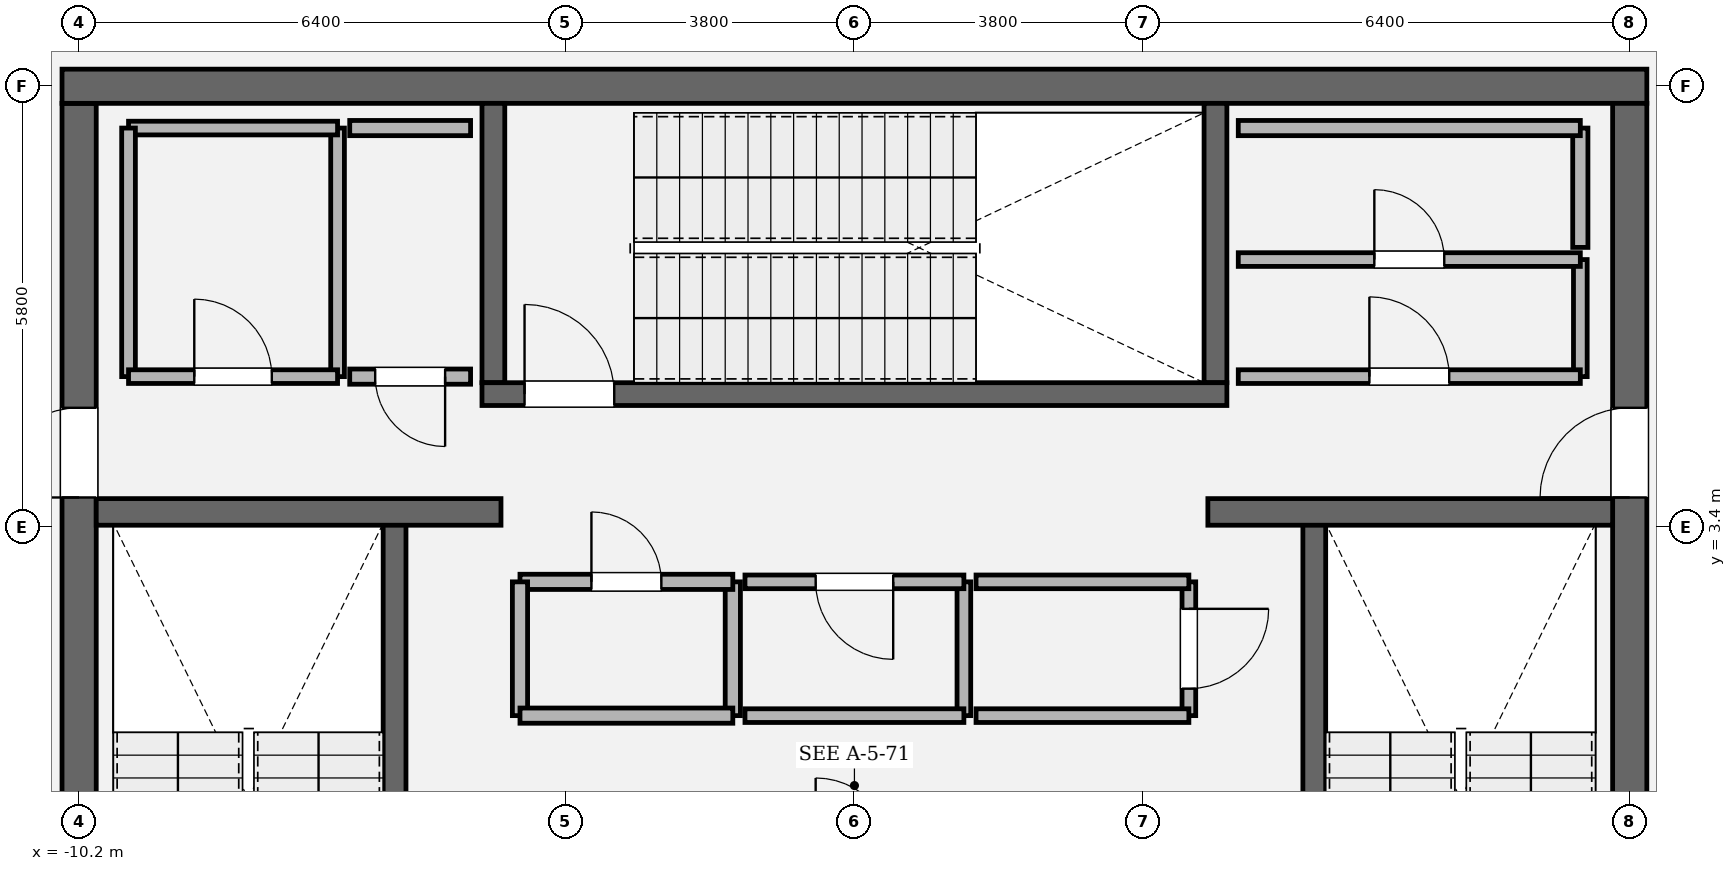
"""IFC4 building model, lengths in metres.
Left out: names, types, materials, properties, quantities, classifications, styles, units other than length and angle.
Written with IfcOpenShell. Run it as: python <this file> out.ifc"""

import sys

from ifc_helpers import new_model, si_unit, direction, frame, frame_2d, origin, place, context, subcontext, project, spatial, rectangle, extrude, element, fill, save


model = new_model("IFC4")
c1 = context("Model", 3, precision=1e-05, world=origin(), true_north=direction((0.0, 1.0)))
c2 = subcontext(c1, "Body", "Model", "MODEL_VIEW")
j1 = project(units=[si_unit("LENGTHUNIT", "METRE"), si_unit("PLANEANGLEUNIT", "RADIAN")], contexts=[c1])
p1 = place(None, origin())
s1 = spatial("IfcSite", under=j1, at=p1, CompositionType="ELEMENT")
p2 = place(p1, origin())
s2 = spatial("IfcBuilding", under=s1, at=p2, CompositionType="ELEMENT")
p3 = place(p2, frame((0.0, 0.0, 339.0)))
s3 = spatial("IfcBuildingStorey", under=s2, at=p3, CompositionType="ELEMENT", Elevation=339.0)
p4 = place(p3, frame((-10.2, -8.975, 0.0), z_axis=(0.0, 0.0, 1.0), x_axis=(0.0, 1.0, 0.0)))
e1 = element("IfcWall", 1, at=p4, inside=s3, PredefinedType="SHEAR", context=c2, shape_type="SweptSolid", body=[
    extrude(rectangle(XDim=17.95, YDim=0.45, at=frame_2d((8.975, 0.0))), origin(), (0.0, 0.0, 1.0), 4.8),
])
p5 = place(p4, frame((12.765, 0.0, 0.0)))
e2 = element("IfcOpeningElement", 2, at=p5, cuts=e1, PredefinedType="OPENING", context=c2, shape_type="SweptSolid", body=[
    extrude(rectangle(XDim=1.18, YDim=2.2, at=frame_2d((0.59, 1.1))), frame((0.0, 0.235, 0.0), z_axis=(0.0, -1.0, 0.0), x_axis=(1.0, 0.0, 0.0)), (0.0, 0.0, 1.0), 0.47),
])
p6 = place(p3, frame((-10.425, 9.2, 0.0), z_axis=(0.0, 0.0, 1.0), x_axis=(1.0, 0.0, 0.0)))
e3 = element("IfcWall", 3, at=p6, inside=s3, PredefinedType="SHEAR", context=c2, shape_type="SweptSolid", body=[
    extrude(rectangle(XDim=20.85, YDim=0.45, at=frame_2d((10.425, 0.0))), origin(), (0.0, 0.0, 1.0), 4.8),
])
p7 = place(p3, frame((10.2, 8.975, 0.0), z_axis=(0.0, 0.0, 1.0), x_axis=(0.0, -1.0, 0.0)))
e4 = element("IfcWall", 4, at=p7, inside=s3, PredefinedType="SHEAR", context=c2, shape_type="SweptSolid", body=[
    extrude(rectangle(XDim=17.95, YDim=0.45, at=frame_2d((8.975, 0.0))), origin(), (0.0, 0.0, 1.0), 4.8),
])
p8 = place(p7, frame((4.005, 0.0, 0.0)))
e5 = element("IfcOpeningElement", 5, at=p8, cuts=e4, PredefinedType="OPENING", context=c2, shape_type="SweptSolid", body=[
    extrude(rectangle(XDim=1.18, YDim=2.2, at=frame_2d((0.59, 1.1))), frame((0.0, 0.235, 0.0), z_axis=(0.0, -1.0, 0.0), x_axis=(1.0, 0.0, 0.0)), (0.0, 0.0, 1.0), 0.47),
])
for number, where, z_axis, x_axis in (
    (6, (-6.05, -5.5, 0.0), (0.0, 0.0, 1.0), (0.0, 1.0, 0.0)),
    (7, (6.05, 3.45, 0.0), (0.0, 0.0, 1.0), (0.0, -1.0, 0.0)),
):
    element("IfcWall", number, at=place(p3, frame(where, z_axis=z_axis, x_axis=x_axis)), inside=s3, PredefinedType="SOLIDWALL", context=c2, shape_type="SweptSolid", body=[
        extrude(rectangle(XDim=8.95, YDim=0.3, at=frame_2d((4.475, 0.0))), origin(), (0.0, 0.0, 1.0), 4.8),
    ])
for number, where, z_axis, x_axis in (
    (8, (-4.75, 5.3, 0.0), (0.0, 0.0, 1.0), (0.0, 1.0, 0.0)),
    (9, (4.75, 8.975, 0.0), (0.0, 0.0, 1.0), (0.0, -1.0, 0.0)),
):
    element("IfcWall", number, at=place(p3, frame(where, z_axis=z_axis, x_axis=x_axis)), inside=s3, PredefinedType="SOLIDWALL", context=c2, shape_type="SweptSolid", body=[
        extrude(rectangle(XDim=3.675, YDim=0.3, at=frame_2d((1.837, 0.0))), origin(), (0.0, 0.0, 1.0), 4.8),
    ])
p9 = place(p3, frame((-4.9, 5.15, 0.0), z_axis=(0.0, 0.0, 1.0), x_axis=(1.0, 0.0, 0.0)))
e10 = element("IfcWall", 10, at=p9, inside=s3, PredefinedType="SOLIDWALL", context=c2, shape_type="SweptSolid", body=[
    extrude(rectangle(XDim=9.8, YDim=0.3, at=frame_2d((4.9, 0.0))), origin(), (0.0, 0.0, 1.0), 4.8),
])
p10 = place(p9, frame((0.56, 0.0, 0.0)))
e11 = element("IfcOpeningElement", 11, at=p10, cuts=e10, PredefinedType="OPENING", context=c2, shape_type="SweptSolid", body=[
    extrude(rectangle(XDim=1.18, YDim=2.2, at=frame_2d((0.59, 1.1))), frame((0.0, 0.16, 0.0), z_axis=(0.0, -1.0, 0.0), x_axis=(1.0, 0.0, 0.0)), (0.0, 0.0, 1.0), 0.32),
])
for number, where, z_axis, x_axis in (
    (12, (-9.975, 3.6, 0.0), (0.0, 0.0, 1.0), (1.0, 0.0, 0.0)),
    (13, (4.65, 3.6, 0.0), (0.0, 0.0, 1.0), (1.0, 0.0, 0.0)),
):
    element("IfcWall", number, at=place(p3, frame(where, z_axis=z_axis, x_axis=x_axis)), inside=s3, PredefinedType="SOLIDWALL", context=c2, shape_type="SweptSolid", body=[
        extrude(rectangle(XDim=5.325, YDim=0.35, at=frame_2d((2.663, 0.0))), origin(), (0.0, 0.0, 1.0), 4.8),
    ])
p11 = place(p3, frame((-1.6, 0.92, 0.0), z_axis=(0.0, 0.0, 1.0), x_axis=(0.0, 1.0, 0.0)))
e14 = element("IfcWall", 14, at=p11, inside=s3, PredefinedType="SOLIDWALL", context=c2, shape_type="SweptSolid", body=[
    extrude(rectangle(XDim=1.76, YDim=0.2, at=frame_2d((0.88, 0.0))), origin(), (0.0, 0.0, 1.0), 4.52),
])
p12 = place(p3, frame((-1.6, 2.68, 0.0), z_axis=(0.0, 0.0, 1.0), x_axis=(-1.0, 0.0, 0.0)))
e15 = element("IfcWall", 15, at=p12, inside=s3, PredefinedType="SOLIDWALL", context=c2, shape_type="SweptSolid", body=[
    extrude(rectangle(XDim=2.8, YDim=0.2, at=frame_2d((1.4, 0.0))), origin(), (0.0, 0.0, 1.0), 4.52),
])
p13 = place(p12, frame((0.94, 0.0, 0.0)))
e16 = element("IfcOpeningElement", 16, at=p13, cuts=e15, PredefinedType="OPENING", context=c2, shape_type="SweptSolid", body=[
    extrude(rectangle(XDim=0.92, YDim=2.1, at=frame_2d((0.46, 1.05))), frame((0.0, 0.11, 0.0), z_axis=(0.0, -1.0, 0.0), x_axis=(1.0, 0.0, 0.0)), (0.0, 0.0, 1.0), 0.22),
])
p14 = place(p3, frame((-4.4, 2.68, 0.0), z_axis=(0.0, 0.0, 1.0), x_axis=(0.0, -1.0, 0.0)))
e17 = element("IfcWall", 17, at=p14, inside=s3, PredefinedType="SOLIDWALL", context=c2, shape_type="SweptSolid", body=[
    extrude(rectangle(XDim=1.76, YDim=0.2, at=frame_2d((0.88, 0.0))), origin(), (0.0, 0.0, 1.0), 4.52),
])
p15 = place(p3, frame((-4.4, 0.92, 0.0), z_axis=(0.0, 0.0, 1.0), x_axis=(1.0, 0.0, 0.0)))
e18 = element("IfcWall", 18, at=p15, inside=s3, PredefinedType="SOLIDWALL", context=c2, shape_type="SweptSolid", body=[
    extrude(rectangle(XDim=2.8, YDim=0.2, at=frame_2d((1.4, 0.0))), origin(), (0.0, 0.0, 1.0), 4.52),
])
p16 = place(p3, frame((1.44, 0.92, 0.0), z_axis=(0.0, 0.0, 1.0), x_axis=(0.0, 1.0, 0.0)))
e19 = element("IfcWall", 19, at=p16, inside=s3, PredefinedType="PARTITIONING", context=c2, shape_type="SweptSolid", body=[
    extrude(rectangle(XDim=1.76, YDim=0.18, at=frame_2d((0.88, 0.0))), origin(), (0.0, 0.0, 1.0), 4.52),
])
p17 = place(p3, frame((1.44, 2.68, 0.0), z_axis=(0.0, 0.0, 1.0), x_axis=(-1.0, 0.0, 0.0)))
e20 = element("IfcWall", 20, at=p17, inside=s3, PredefinedType="PARTITIONING", context=c2, shape_type="SweptSolid", body=[
    extrude(rectangle(XDim=2.88, YDim=0.18, at=frame_2d((1.44, 0.0))), origin(), (0.0, 0.0, 1.0), 4.52),
])
p18 = place(p17, frame((0.93, 0.0, 0.0)))
e21 = element("IfcOpeningElement", 21, at=p18, cuts=e20, PredefinedType="OPENING", context=c2, shape_type="SweptSolid", body=[
    extrude(rectangle(XDim=1.02, YDim=2.2, at=frame_2d((0.51, 1.1))), frame((0.0, 0.1, 0.0), z_axis=(0.0, -1.0, 0.0), x_axis=(1.0, 0.0, 0.0)), (0.0, 0.0, 1.0), 0.2),
])
p19 = place(p3, frame((-1.44, 0.92, 0.0), z_axis=(0.0, 0.0, 1.0), x_axis=(1.0, 0.0, 0.0)))
e22 = element("IfcWall", 22, at=p19, inside=s3, PredefinedType="PARTITIONING", context=c2, shape_type="SweptSolid", body=[
    extrude(rectangle(XDim=2.88, YDim=0.18, at=frame_2d((1.44, 0.0))), origin(), (0.0, 0.0, 1.0), 4.52),
])
p20 = place(p3, frame((4.4, 0.92, 0.0), z_axis=(0.0, 0.0, 1.0), x_axis=(0.0, 1.0, 0.0)))
e23 = element("IfcWall", 23, at=p20, inside=s3, PredefinedType="PARTITIONING", context=c2, shape_type="SweptSolid", body=[
    extrude(rectangle(XDim=1.76, YDim=0.18, at=frame_2d((0.88, 0.0))), origin(), (0.0, 0.0, 1.0), 4.52),
])
p21 = place(p20, frame((0.355, 0.0, 0.0)))
e24 = element("IfcOpeningElement", 24, at=p21, cuts=e23, PredefinedType="OPENING", context=c2, shape_type="SweptSolid", body=[
    extrude(rectangle(XDim=1.05, YDim=2.2, at=frame_2d((0.525, 1.1))), frame((0.0, 0.1, 0.0), z_axis=(0.0, -1.0, 0.0), x_axis=(1.0, 0.0, 0.0)), (0.0, 0.0, 1.0), 0.2),
])
for number, where, z_axis, x_axis in (
    (25, (4.4, 2.68, 0.0), (0.0, 0.0, 1.0), (-1.0, 0.0, 0.0)),
    (26, (1.6, 0.92, 0.0), (0.0, 0.0, 1.0), (1.0, 0.0, 0.0)),
):
    element("IfcWall", number, at=place(p3, frame(where, z_axis=z_axis, x_axis=x_axis)), inside=s3, PredefinedType="PARTITIONING", context=c2, shape_type="SweptSolid", body=[
        extrude(rectangle(XDim=2.8, YDim=0.18, at=frame_2d((1.4, 0.0))), origin(), (0.0, 0.0, 1.0), 4.52),
    ])
p22 = place(p3, frame((-6.8, 5.38, 0.0), z_axis=(0.0, 0.0, 1.0), x_axis=(0.0, 1.0, 0.0)))
e27 = element("IfcWall", 27, at=p22, inside=s3, PredefinedType="PARTITIONING", context=c2, shape_type="SweptSolid", body=[
    extrude(rectangle(XDim=3.27, YDim=0.18, at=frame_2d((1.635, 0.0))), origin(), (0.0, 0.0, 1.0), 4.52),
])
p23 = place(p3, frame((-6.8, 8.65, 0.0), z_axis=(0.0, 0.0, 1.0), x_axis=(-1.0, 0.0, 0.0)))
e28 = element("IfcWall", 28, at=p23, inside=s3, PredefinedType="PARTITIONING", context=c2, shape_type="SweptSolid", body=[
    extrude(rectangle(XDim=2.75, YDim=0.18, at=frame_2d((1.375, 0.0))), origin(), (0.0, 0.0, 1.0), 4.52),
])
p24 = place(p3, frame((-9.55, 8.65, 0.0), z_axis=(0.0, 0.0, 1.0), x_axis=(0.0, -1.0, 0.0)))
e29 = element("IfcWall", 29, at=p24, inside=s3, PredefinedType="PARTITIONING", context=c2, shape_type="SweptSolid", body=[
    extrude(rectangle(XDim=3.27, YDim=0.18, at=frame_2d((1.635, 0.0))), origin(), (0.0, 0.0, 1.0), 4.52),
])
p25 = place(p3, frame((-9.55, 5.38, 0.0), z_axis=(0.0, 0.0, 1.0), x_axis=(1.0, 0.0, 0.0)))
e30 = element("IfcWall", 30, at=p25, inside=s3, PredefinedType="PARTITIONING", context=c2, shape_type="SweptSolid", body=[
    extrude(rectangle(XDim=2.75, YDim=0.18, at=frame_2d((1.375, 0.0))), origin(), (0.0, 0.0, 1.0), 4.52),
])
p26 = place(p25, frame((0.865, 0.0, 0.0)))
e31 = element("IfcOpeningElement", 31, at=p26, cuts=e30, PredefinedType="OPENING", context=c2, shape_type="SweptSolid", body=[
    extrude(rectangle(XDim=1.02, YDim=2.2, at=frame_2d((0.51, 1.1))), frame((0.0, 0.1, 0.0), z_axis=(0.0, -1.0, 0.0), x_axis=(1.0, 0.0, 0.0)), (0.0, 0.0, 1.0), 0.2),
])
p27 = place(p3, frame((-5.05, 8.65, 0.0), z_axis=(0.0, 0.0, 1.0), x_axis=(-1.0, 0.0, 0.0)))
e32 = element("IfcWall", 32, at=p27, inside=s3, PredefinedType="SOLIDWALL", context=c2, shape_type="SweptSolid", body=[
    extrude(rectangle(XDim=1.59, YDim=0.2, at=frame_2d((0.795, 0.0))), origin(), (0.0, 0.0, 1.0), 4.52),
])
p28 = place(p3, frame((-6.64, 5.38, 0.0), z_axis=(0.0, 0.0, 1.0), x_axis=(1.0, 0.0, 0.0)))
e33 = element("IfcWall", 33, at=p28, inside=s3, PredefinedType="SOLIDWALL", context=c2, shape_type="SweptSolid", body=[
    extrude(rectangle(XDim=1.59, YDim=0.2, at=frame_2d((0.795, 0.0))), origin(), (0.0, 0.0, 1.0), 4.52),
])
p29 = place(p28, frame((0.335, 0.0, 0.0)))
e34 = element("IfcOpeningElement", 34, at=p29, cuts=e33, PredefinedType="OPENING", context=c2, shape_type="SweptSolid", body=[
    extrude(rectangle(XDim=0.92, YDim=2.1, at=frame_2d((0.46, 1.05))), frame((0.0, 0.11, 0.0), z_axis=(0.0, -1.0, 0.0), x_axis=(1.0, 0.0, 0.0)), (0.0, 0.0, 1.0), 0.22),
])
p30 = place(p3, frame((9.55, 5.38, 0.0), z_axis=(0.0, 0.0, 1.0), x_axis=(0.0, 1.0, 0.0)))
e35 = element("IfcWall", 35, at=p30, inside=s3, PredefinedType="PARTITIONING", context=c2, shape_type="SweptSolid", body=[
    extrude(rectangle(XDim=1.54, YDim=0.18, at=frame_2d((0.77, 0.0))), origin(), (0.0, 0.0, 1.0), 4.52),
])
p31 = place(p3, frame((9.55, 6.92, 0.0), z_axis=(0.0, 0.0, 1.0), x_axis=(-1.0, 0.0, 0.0)))
e36 = element("IfcWall", 36, at=p31, inside=s3, PredefinedType="PARTITIONING", context=c2, shape_type="SweptSolid", body=[
    extrude(rectangle(XDim=4.5, YDim=0.18, at=frame_2d((2.25, 0.0))), origin(), (0.0, 0.0, 1.0), 4.52),
])
p32 = place(p31, frame((1.79, 0.0, 0.0)))
e37 = element("IfcOpeningElement", 37, at=p32, cuts=e36, PredefinedType="OPENING", context=c2, shape_type="SweptSolid", body=[
    extrude(rectangle(XDim=0.92, YDim=2.1, at=frame_2d((0.46, 1.05))), frame((0.0, 0.1, 0.0), z_axis=(0.0, -1.0, 0.0), x_axis=(1.0, 0.0, 0.0)), (0.0, 0.0, 1.0), 0.2),
])
p33 = place(p3, frame((5.05, 5.38, 0.0), z_axis=(0.0, 0.0, 1.0), x_axis=(1.0, 0.0, 0.0)))
e38 = element("IfcWall", 38, at=p33, inside=s3, PredefinedType="PARTITIONING", context=c2, shape_type="SweptSolid", body=[
    extrude(rectangle(XDim=4.5, YDim=0.18, at=frame_2d((2.25, 0.0))), origin(), (0.0, 0.0, 1.0), 4.52),
])
p34 = place(p33, frame((1.725, 0.0, 0.0)))
e39 = element("IfcOpeningElement", 39, at=p34, cuts=e38, PredefinedType="OPENING", context=c2, shape_type="SweptSolid", body=[
    extrude(rectangle(XDim=1.05, YDim=2.2, at=frame_2d((0.525, 1.1))), frame((0.0, 0.1, 0.0), z_axis=(0.0, -1.0, 0.0), x_axis=(1.0, 0.0, 0.0)), (0.0, 0.0, 1.0), 0.2),
])
p35 = place(p3, frame((9.55, 7.08, 0.0), z_axis=(0.0, 0.0, 1.0), x_axis=(0.0, 1.0, 0.0)))
e40 = element("IfcWall", 40, at=p35, inside=s3, PredefinedType="SOLIDWALL", context=c2, shape_type="SweptSolid", body=[
    extrude(rectangle(XDim=1.57, YDim=0.2, at=frame_2d((0.785, 0.0))), origin(), (0.0, 0.0, 1.0), 4.52),
])
p36 = place(p3, frame((9.55, 8.65, 0.0), z_axis=(0.0, 0.0, 1.0), x_axis=(-1.0, 0.0, 0.0)))
e41 = element("IfcWall", 41, at=p36, inside=s3, PredefinedType="SOLIDWALL", context=c2, shape_type="SweptSolid", body=[
    extrude(rectangle(XDim=4.5, YDim=0.2, at=frame_2d((2.25, 0.0))), origin(), (0.0, 0.0, 1.0), 4.52),
])
p37 = place(p10, origin())
e42 = element("IfcDoor", 42, at=p37, inside=s3, OperationType="SINGLE_SWING_LEFT", PredefinedType="DOOR", context=c2, shape_type="SweptSolid", body=[
    extrude(rectangle(XDim=1.18, YDim=2.2, at=frame_2d((0.59, 1.1))), frame((0.0, 0.025, 0.0), z_axis=(0.0, -1.0, 0.0), x_axis=(1.0, 0.0, 0.0)), (0.0, 0.0, 1.0), 0.05),
])
fill(e11, e42)
p38 = place(p5, origin())
e43 = element("IfcDoor", 43, at=p38, inside=s3, OperationType="SINGLE_SWING_LEFT", PredefinedType="DOOR", context=c2, shape_type="SweptSolid", body=[
    extrude(rectangle(XDim=1.18, YDim=2.2, at=frame_2d((0.59, 1.1))), frame((0.0, 0.025, 0.0), z_axis=(0.0, -1.0, 0.0), x_axis=(1.0, 0.0, 0.0)), (0.0, 0.0, 1.0), 0.05),
])
fill(e2, e43)
p39 = place(p8, origin())
e44 = element("IfcDoor", 44, at=p39, inside=s3, OperationType="SINGLE_SWING_RIGHT", PredefinedType="DOOR", context=c2, shape_type="SweptSolid", body=[
    extrude(rectangle(XDim=1.18, YDim=2.2, at=frame_2d((0.59, 1.1))), frame((0.0, 0.025, 0.0), z_axis=(0.0, -1.0, 0.0), x_axis=(1.0, 0.0, 0.0)), (0.0, 0.0, 1.0), 0.05),
])
fill(e5, e44)
p40 = place(p13, origin())
e45 = element("IfcDoor", 45, at=p40, inside=s3, OperationType="SINGLE_SWING_RIGHT", PredefinedType="DOOR", context=c2, shape_type="SweptSolid", body=[
    extrude(rectangle(XDim=0.92, YDim=2.1, at=frame_2d((0.46, 1.05))), frame((0.0, 0.025, 0.0), z_axis=(0.0, -1.0, 0.0), x_axis=(1.0, 0.0, 0.0)), (0.0, 0.0, 1.0), 0.05),
])
fill(e16, e45)
p41 = place(p18, origin())
e46 = element("IfcDoor", 46, at=p41, inside=s3, OperationType="SINGLE_SWING_LEFT", PredefinedType="DOOR", context=c2, shape_type="SweptSolid", body=[
    extrude(rectangle(XDim=1.02, YDim=2.2, at=frame_2d((0.51, 1.1))), frame((0.0, 0.025, 0.0), z_axis=(0.0, -1.0, 0.0), x_axis=(1.0, 0.0, 0.0)), (0.0, 0.0, 1.0), 0.05),
])
fill(e21, e46)
p42 = place(p21, origin())
e47 = element("IfcDoor", 47, at=p42, inside=s3, OperationType="SINGLE_SWING_RIGHT", PredefinedType="DOOR", context=c2, shape_type="SweptSolid", body=[
    extrude(rectangle(XDim=1.05, YDim=2.2, at=frame_2d((0.525, 1.1))), frame((0.0, 0.025, 0.0), z_axis=(0.0, -1.0, 0.0), x_axis=(1.0, 0.0, 0.0)), (0.0, 0.0, 1.0), 0.05),
])
fill(e24, e47)
p43 = place(p26, origin())
e48 = element("IfcDoor", 48, at=p43, inside=s3, OperationType="SINGLE_SWING_LEFT", PredefinedType="DOOR", context=c2, shape_type="SweptSolid", body=[
    extrude(rectangle(XDim=1.02, YDim=2.2, at=frame_2d((0.51, 1.1))), frame((0.0, 0.025, 0.0), z_axis=(0.0, -1.0, 0.0), x_axis=(1.0, 0.0, 0.0)), (0.0, 0.0, 1.0), 0.05),
])
fill(e31, e48)
p44 = place(p29, origin())
e49 = element("IfcDoor", 49, at=p44, inside=s3, OperationType="SINGLE_SWING_RIGHT", PredefinedType="DOOR", context=c2, shape_type="SweptSolid", body=[
    extrude(rectangle(XDim=0.92, YDim=2.1, at=frame_2d((0.46, 1.05))), frame((0.0, 0.025, 0.0), z_axis=(0.0, -1.0, 0.0), x_axis=(1.0, 0.0, 0.0)), (0.0, 0.0, 1.0), 0.05),
])
fill(e34, e49)
p45 = place(p34, origin())
e50 = element("IfcDoor", 50, at=p45, inside=s3, OperationType="SINGLE_SWING_LEFT", PredefinedType="DOOR", context=c2, shape_type="SweptSolid", body=[
    extrude(rectangle(XDim=1.05, YDim=2.2, at=frame_2d((0.525, 1.1))), frame((0.0, 0.025, 0.0), z_axis=(0.0, -1.0, 0.0), x_axis=(1.0, 0.0, 0.0)), (0.0, 0.0, 1.0), 0.05),
])
fill(e39, e50)
p46 = place(p32, origin())
e51 = element("IfcDoor", 51, at=p46, inside=s3, OperationType="SINGLE_SWING_RIGHT", PredefinedType="DOOR", context=c2, shape_type="SweptSolid", body=[
    extrude(rectangle(XDim=0.92, YDim=2.1, at=frame_2d((0.46, 1.05))), frame((0.0, 0.025, 0.0), z_axis=(0.0, -1.0, 0.0), x_axis=(1.0, 0.0, 0.0)), (0.0, 0.0, 1.0), 0.05),
])
fill(e37, e51)
save(model, sys.argv[1])
